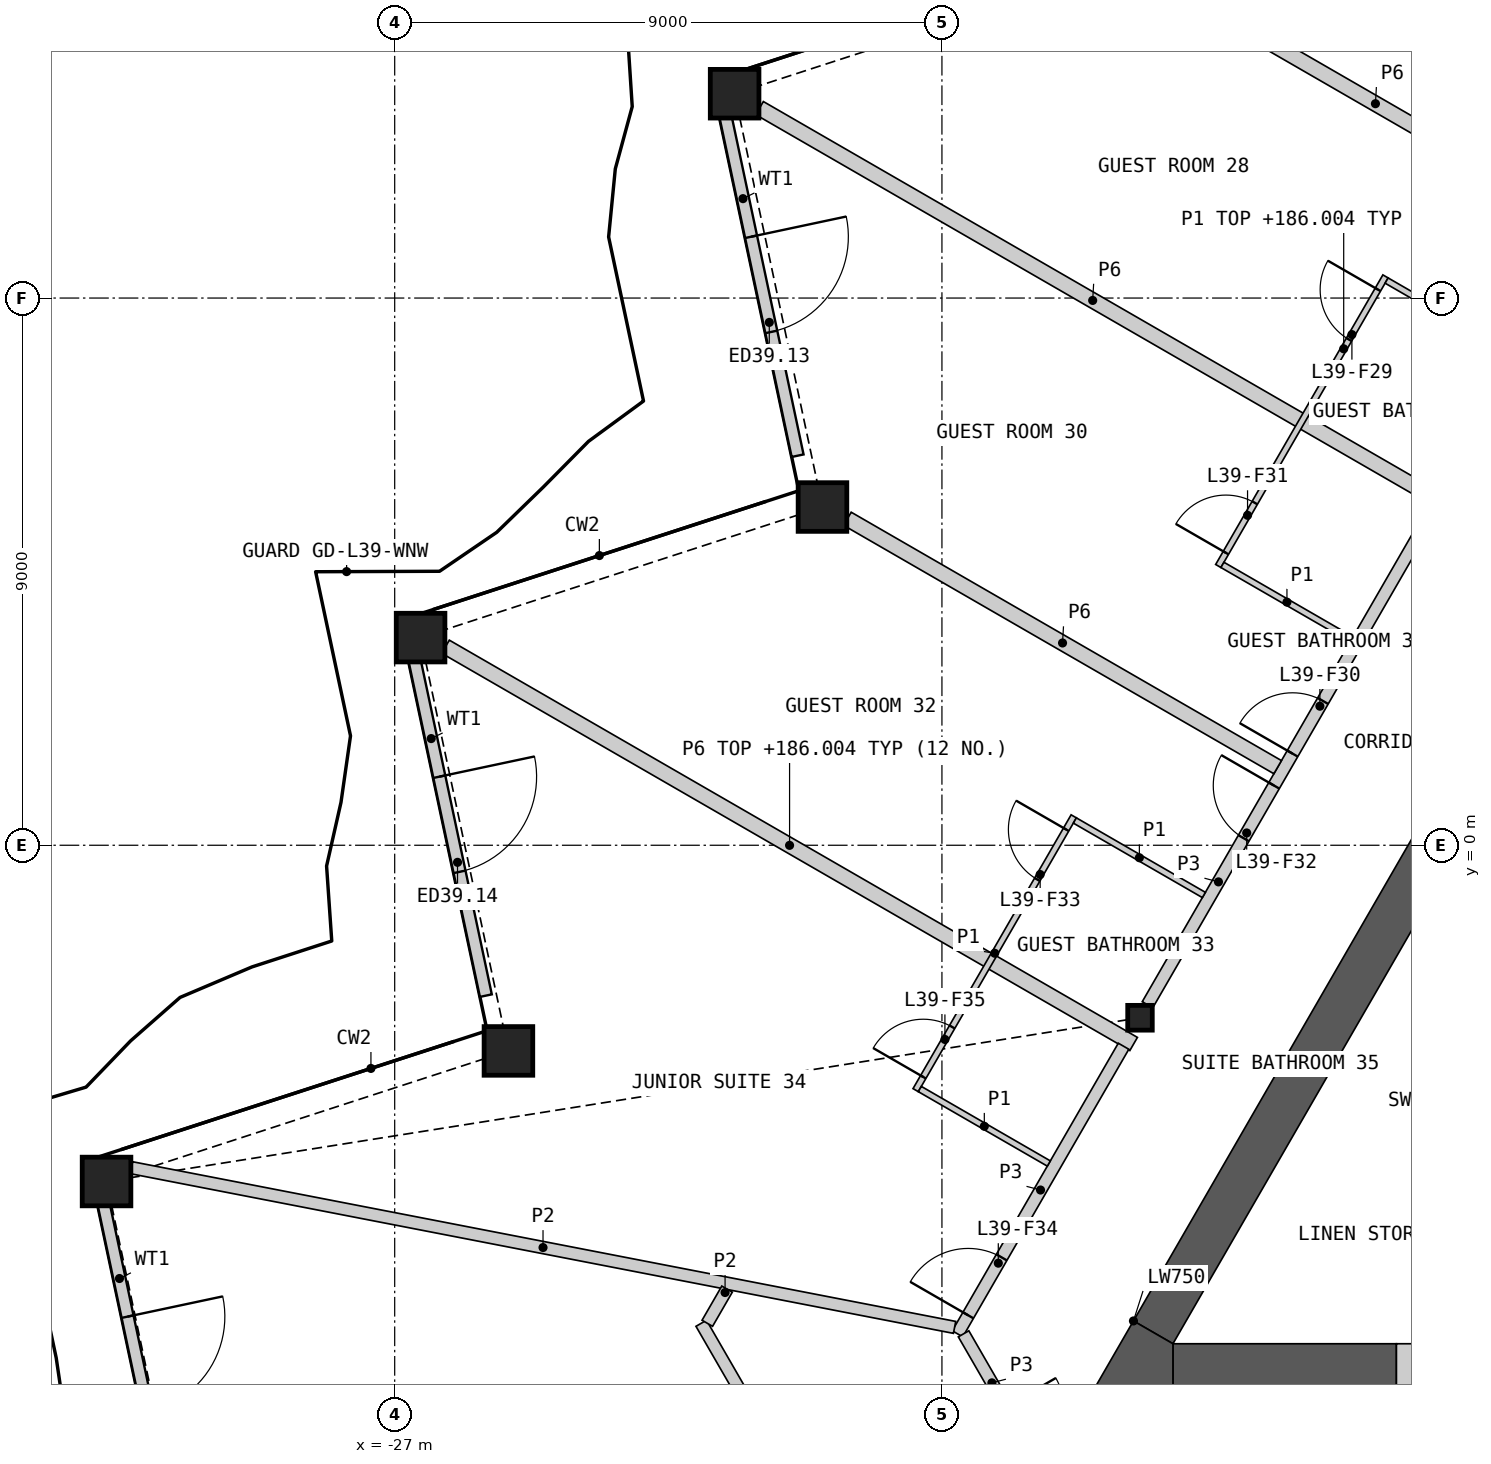
"""IFC4 building model, lengths in metres.
Left out: names, types, materials, properties, quantities, classifications, styles, units other than length and angle.
Written with IfcOpenShell. Run it as: python <this file> out.ifc"""

import sys

from ifc_helpers import new_model, si_unit, direction, frame, frame_2d, origin, origin_2d, place, context, subcontext, project, spatial, polyline, rectangle, hollow_rectangle, i_section, outline, extrude, element, fill, save


model = new_model("IFC4")
c1 = context("Model", 3, precision=1e-05, world=origin(), true_north=direction((0.0, 1.0)))
c2 = subcontext(c1, "Body", "Model", "MODEL_VIEW")
j1 = project(units=[si_unit("LENGTHUNIT", "METRE"), si_unit("PLANEANGLEUNIT", "RADIAN")], contexts=[c1])
p1 = place(None, origin())
s1 = spatial("IfcSite", under=j1, at=p1, CompositionType="ELEMENT")
p2 = place(p1, origin())
s2 = spatial("IfcBuilding", under=s1, at=p2, CompositionType="ELEMENT")
p3 = place(p2, frame((0.0, 0.0, 183.6)))
s3 = spatial("IfcBuildingStorey", under=s2, at=p3, CompositionType="ELEMENT", Elevation=183.6)
for number, where, z_axis, x_axis in (
    (1, (-21.409, 12.361, 0.0), (0.0, 0.0, 1.0), (1.0, 0.0, 0.0)),
    (2, (-19.965, 5.563, 0.0), (0.0, 0.0, 1.0), (1.0, 0.0, 0.0)),
    (3, (-26.574, 3.415, 0.0), (0.0, 0.0, 1.0), (1.0, 0.0, 0.0)),
    (4, (-25.129, -3.383, 0.0), (0.0, 0.0, 1.0), (1.0, 0.0, 0.0)),
    (5, (-31.739, -5.53, 0.0), (0.0, 0.0, 1.0), (1.0, 0.0, 0.0)),
):
    element("IfcColumn", number, at=place(p3, frame(where, z_axis=z_axis, x_axis=x_axis)), inside=s3, PredefinedType="COLUMN", context=c2, shape_type="SweptSolid", body=[
        extrude(hollow_rectangle(XDim=0.8, YDim=0.8, WallThickness=0.05, at=origin_2d()), origin(), (0.0, 0.0, 1.0), 3.6),
    ])
p4 = place(p3, frame((-14.743, -2.837, 0.0), z_axis=(0.0, 0.0, 1.0), x_axis=(1.0, 0.0, 0.0)))
e6 = element("IfcColumn", 6, at=p4, inside=s3, PredefinedType="COLUMN", context=c2, shape_type="SweptSolid", body=[
    extrude(i_section(OverallWidth=0.404, OverallDepth=0.407, WebThickness=0.027, FlangeThickness=0.044, at=origin_2d()), origin(), (0.0, 0.0, 1.0), 3.6),
])
p5 = place(p3, frame((-21.572, 12.044, 0.0), z_axis=(0.0, 0.0, 1.0), x_axis=(0.207914487103, -0.978147006361, 0.0)))
e7 = element("IfcWall", 7, at=p5, inside=s3, PredefinedType="SOLIDWALL", context=c2, shape_type="SweptSolid", body=[
    extrude(rectangle(XDim=5.763, YDim=0.2, at=frame_2d((2.882, 0.0))), origin(), (0.0, 0.0, 1.0), 2.701),
])
p6 = place(p5, frame((2.082, 0.0, 0.0)))
e8 = element("IfcOpeningElement", 8, at=p6, cuts=e7, PredefinedType="OPENING", context=c2, shape_type="SweptSolid", body=[
    extrude(rectangle(XDim=1.6, YDim=2.4, at=frame_2d((0.8, 1.2))), frame((0.0, 0.11, 0.0), z_axis=(0.0, -1.0, 0.0), x_axis=(1.0, 0.0, 0.0)), (0.0, 0.0, 1.0), 0.22),
])
p7 = place(p3, frame((-26.699, 3.164, 0.0), z_axis=(0.0, 0.0, 1.0), x_axis=(0.207914487103, -0.978147006361, 0.0)))
e9 = element("IfcWall", 9, at=p7, inside=s3, PredefinedType="SOLIDWALL", context=c2, shape_type="SweptSolid", body=[
    extrude(rectangle(XDim=5.763, YDim=0.2, at=frame_2d((2.882, 0.0))), origin(), (0.0, 0.0, 1.0), 2.701),
])
p8 = place(p7, frame((2.082, 0.0, 0.0)))
e10 = element("IfcOpeningElement", 10, at=p8, cuts=e9, PredefinedType="OPENING", context=c2, shape_type="SweptSolid", body=[
    extrude(rectangle(XDim=1.6, YDim=2.4, at=frame_2d((0.8, 1.2))), frame((0.0, 0.11, 0.0), z_axis=(0.0, -1.0, 0.0), x_axis=(1.0, 0.0, 0.0)), (0.0, 0.0, 1.0), 0.22),
])
p9 = place(p3, frame((-31.826, -5.717, 0.0), z_axis=(0.0, 0.0, 1.0), x_axis=(0.207914487103, -0.978147006361, 0.0)))
e11 = element("IfcWall", 11, at=p9, inside=s3, PredefinedType="SOLIDWALL", context=c2, shape_type="SweptSolid", body=[
    extrude(rectangle(XDim=5.763, YDim=0.2, at=frame_2d((2.882, 0.0))), origin(), (0.0, 0.0, 1.0), 2.701),
])
p10 = place(p9, frame((2.082, 0.0, 0.0)))
e12 = element("IfcOpeningElement", 12, at=p10, cuts=e11, PredefinedType="OPENING", context=c2, shape_type="SweptSolid", body=[
    extrude(rectangle(XDim=1.6, YDim=2.4, at=frame_2d((0.8, 1.2))), frame((0.0, 0.11, 0.0), z_axis=(0.0, -1.0, 0.0), x_axis=(1.0, 0.0, 0.0)), (0.0, 0.0, 1.0), 0.22),
])
p11 = place(p3, origin())
e13 = element("IfcWall", 13, at=p11, inside=s3, PredefinedType="SHEAR", context=c2, shape_type="SweptSolid", body=[
    extrude(outline(polyline([(-5.307, -1.281), (-10.374, -4.206), (-10.032, -4.298), (-5.182, -1.498), (-5.307, -1.281)])), origin(), (0.0, 0.0, 1.0), 3.25),
])
p12 = place(p3, origin())
e14 = element("IfcWall", 14, at=p12, inside=s3, PredefinedType="SHEAR", context=c2, shape_type="SweptSolid", body=[
    extrude(outline(polyline([(-10.374, -4.206), (-8.83, -6.881), (-8.738, -6.539), (-10.032, -4.298), (-10.374, -4.206)])), origin(), (0.0, 0.0, 1.0), 3.25),
])
p13 = place(p3, frame((-14.201, -8.574, 0.0), z_axis=(0.0, 0.0, 1.0), x_axis=(1.0, 0.0, 0.0)))
e15 = element("IfcWall", 15, at=p13, inside=s3, PredefinedType="SHEAR", context=c2, shape_type="SweptSolid", body=[
    extrude(rectangle(XDim=3.676, YDim=0.75, at=frame_2d((1.838, 0.0))), origin(), (0.0, 0.0, 1.0), 3.25),
])
p14 = place(p3, frame((-9.625, 0.477, 0.0), z_axis=(0.0, 0.0, 1.0), x_axis=(-0.499986234705, -0.866033351035, 0.0)))
e16 = element("IfcWall", 16, at=p14, inside=s3, PredefinedType="SHEAR", context=c2, shape_type="SweptSolid", body=[
    extrude(rectangle(XDim=9.801, YDim=0.75, at=frame_2d((4.9, 0.0))), origin(), (0.0, 0.0, 1.0), 3.25),
])
p15 = place(p3, origin())
e17 = element("IfcWall", 17, at=p15, inside=s3, PredefinedType="SHEAR", context=c2, shape_type="SweptSolid", body=[
    extrude(outline(polyline([(-14.851, -7.824), (-14.201, -8.199), (-14.201, -8.949), (-15.5, -8.949), (-14.851, -7.824)])), origin(), (0.0, 0.0, 1.0), 3.25),
])
p16 = place(p3, frame((-10.525, -8.574, 0.0), z_axis=(0.0, 0.0, 1.0), x_axis=(1.0, 0.0, 0.0)))
e18 = element("IfcWall", 18, at=p16, inside=s3, PredefinedType="SHEAR", context=c2, shape_type="SweptSolid", body=[
    extrude(rectangle(XDim=2.2, YDim=0.75, at=frame_2d((1.1, 0.0))), origin(), (0.0, 0.0, 1.0), 3.25),
])
p17 = place(p16, frame((0.6, 0.0, 0.0)))
e19 = element("IfcOpeningElement", 19, at=p17, cuts=e18, PredefinedType="OPENING", context=c2, shape_type="SweptSolid", body=[
    extrude(rectangle(XDim=1.0, YDim=2.1, at=frame_2d((0.5, 1.05))), frame((0.0, 0.385, 0.0), z_axis=(0.0, -1.0, 0.0), x_axis=(1.0, 0.0, 0.0)), (0.0, 0.0, 1.0), 0.77),
])
p18 = place(p3, frame((-26.164, 3.265, 0.0), z_axis=(0.0, 0.0, 1.0), x_axis=(0.866021313335, -0.500007084799, 0.0)))
e20 = element("IfcWall", 20, at=p18, inside=s3, PredefinedType="PARTITIONING", context=c2, shape_type="SweptSolid", body=[
    extrude(rectangle(XDim=13.068, YDim=0.25, at=frame_2d((6.534, 0.0))), origin(), (0.0, 0.0, 1.0), 2.404),
])
p19 = place(p3, frame((-21.0, 12.124, 0.0), z_axis=(0.0, 0.0, 1.0), x_axis=(0.866025883649, -0.499999168849, 0.0)))
e21 = element("IfcWall", 21, at=p19, inside=s3, PredefinedType="PARTITIONING", context=c2, shape_type="SweptSolid", body=[
    extrude(rectangle(XDim=12.652, YDim=0.25, at=frame_2d((6.326, 0.0))), origin(), (0.0, 0.0, 1.0), 2.404),
])
p20 = place(p3, frame((-14.619, -2.624, 0.0), z_axis=(0.0, 0.0, 1.0), x_axis=(0.50000393355, 0.866023132736, 0.0)))
e22 = element("IfcWall", 22, at=p20, inside=s3, PredefinedType="PARTITIONING", context=c2, shape_type="SweptSolid", body=[
    extrude(rectangle(XDim=9.335, YDim=0.2, at=frame_2d((4.667, 0.0))), origin(), (0.0, 0.0, 1.0), 3.25),
])
p21 = place(p20, frame((4.77, 0.0, 0.0)))
e23 = element("IfcOpeningElement", 23, at=p21, cuts=e22, PredefinedType="OPENING", context=c2, shape_type="SweptSolid", body=[
    extrude(rectangle(XDim=1.0, YDim=2.1, at=frame_2d((0.5, 1.05))), frame((0.0, 0.11, 0.0), z_axis=(0.0, -1.0, 0.0), x_axis=(1.0, 0.0, 0.0)), (0.0, 0.0, 1.0), 0.22),
])
p22 = place(p20, frame((3.163, 0.0, 0.0)))
e24 = element("IfcOpeningElement", 24, at=p22, cuts=e22, PredefinedType="OPENING", context=c2, shape_type="SweptSolid", body=[
    extrude(rectangle(XDim=1.0, YDim=2.1, at=frame_2d((0.5, 1.05))), frame((0.0, 0.11, 0.0), z_axis=(0.0, -1.0, 0.0), x_axis=(1.0, 0.0, 0.0)), (0.0, 0.0, 1.0), 0.22),
])
p23 = place(p3, frame((-19.555, 5.37, 0.0), z_axis=(0.0, 0.0, 1.0), x_axis=(0.866024371346, -0.500001788232, 0.0)))
e25 = element("IfcWall", 25, at=p23, inside=s3, PredefinedType="PARTITIONING", context=c2, shape_type="SweptSolid", body=[
    extrude(rectangle(XDim=8.171, YDim=0.25, at=frame_2d((4.085, 0.0))), origin(), (0.0, 0.0, 1.0), 2.404),
])
p24 = place(p3, frame((-14.39, 14.228, 0.0), z_axis=(0.0, 0.0, 1.0), x_axis=(0.866031008936, -0.499990291468, 0.0)))
e26 = element("IfcWall", 26, at=p24, inside=s3, PredefinedType="PARTITIONING", context=c2, shape_type="SweptSolid", body=[
    extrude(rectangle(XDim=8.127, YDim=0.25, at=frame_2d((4.063, 0.0))), origin(), (0.0, 0.0, 1.0), 2.404),
])
p25 = place(p3, frame((-17.744, -8.035, 0.0), z_axis=(0.0, 0.0, 1.0), x_axis=(0.49998041698, 0.866036709751, 0.0)))
e27 = element("IfcWall", 27, at=p25, inside=s3, PredefinedType="PARTITIONING", context=c2, shape_type="SweptSolid", body=[
    extrude(rectangle(XDim=5.462, YDim=0.2, at=frame_2d((2.731, 0.0))), origin(), (0.0, 0.0, 1.0), 3.25),
])
p26 = place(p25, frame((0.352, 0.0, 0.0)))
e28 = element("IfcOpeningElement", 28, at=p26, cuts=e27, PredefinedType="OPENING", context=c2, shape_type="SweptSolid", body=[
    extrude(rectangle(XDim=1.1, YDim=2.1, at=frame_2d((0.55, 1.05))), frame((0.0, 0.11, 0.0), z_axis=(0.0, -1.0, 0.0), x_axis=(1.0, 0.0, 0.0)), (0.0, 0.0, 1.0), 0.22),
])
p27 = place(p3, frame((-17.644, -8.035, 0.0), z_axis=(0.0, 0.0, 1.0), x_axis=(0.499958791762, -0.866049194065, 0.0)))
e29 = element("IfcWall", 29, at=p27, inside=s3, PredefinedType="PARTITIONING", context=c2, shape_type="SweptSolid", body=[
    extrude(rectangle(XDim=3.726, YDim=0.2, at=frame_2d((1.863, 0.0))), origin(), (0.0, 0.0, 1.0), 3.25),
])
p28 = place(p27, frame((1.388, 0.0, 0.0)))
e30 = element("IfcOpeningElement", 30, at=p28, cuts=e29, PredefinedType="OPENING", context=c2, shape_type="SweptSolid", body=[
    extrude(rectangle(XDim=0.95, YDim=2.1, at=frame_2d((0.475, 1.05))), frame((0.0, 0.11, 0.0), z_axis=(0.0, -1.0, 0.0), x_axis=(1.0, 0.0, 0.0)), (0.0, 0.0, 1.0), 0.22),
])
p29 = place(p3, frame((-31.329, -5.303, 0.0), z_axis=(0.0, 0.0, 1.0), x_axis=(0.981696755608, -0.190450728612, 0.0)))
e31 = element("IfcWall", 31, at=p29, inside=s3, PredefinedType="PARTITIONING", context=c2, shape_type="SweptSolid", body=[
    extrude(rectangle(XDim=13.79, YDim=0.2, at=frame_2d((6.895, 0.0))), origin(), (0.0, 0.0, 1.0), 2.404),
])
p30 = place(p3, frame((-21.958, -7.862, 0.0), z_axis=(0.0, 0.0, 1.0), x_axis=(0.499987304225, -0.866032733569, 0.0)))
e32 = element("IfcWall", 32, at=p30, inside=s3, PredefinedType="PARTITIONING", context=c2, shape_type="SweptSolid", body=[
    extrude(rectangle(XDim=4.176, YDim=0.2, at=frame_2d((2.088, 0.0))), origin(), (0.0, 0.0, 1.0), 2.404),
])
p31 = place(p3, frame((-21.859, -7.862, 0.0), z_axis=(0.0, 0.0, 1.0), x_axis=(0.500102178127, 0.865966403178, 0.0)))
e33 = element("IfcWall", 33, at=p31, inside=s3, PredefinedType="PARTITIONING", context=c2, shape_type="SweptSolid", body=[
    extrude(rectangle(XDim=0.649, YDim=0.2, at=frame_2d((0.325, 0.0))), origin(), (0.0, 0.0, 1.0), 2.404),
])
p32 = place(p3, frame((-13.455, 4.593, 0.0), z_axis=(0.0, 0.0, 1.0), x_axis=(0.500015767406, 0.866016300277, 0.0)))
e34 = element("IfcWall", 34, at=p32, inside=s3, PredefinedType="PARTITIONING", context=c2, shape_type="SweptSolid", body=[
    extrude(rectangle(XDim=5.5, YDim=0.1, at=frame_2d((2.75, 0.0))), origin(), (0.0, 0.0, 1.0), 2.404),
])
p33 = place(p32, frame((4.3, 0.0, 0.0)))
e35 = element("IfcOpeningElement", 35, at=p33, cuts=e34, PredefinedType="OPENING", context=c2, shape_type="SweptSolid", body=[
    extrude(rectangle(XDim=0.95, YDim=2.1, at=frame_2d((0.475, 1.05))), frame((0.0, 0.06, 0.0), z_axis=(0.0, -1.0, 0.0), x_axis=(1.0, 0.0, 0.0)), (0.0, 0.0, 1.0), 0.12),
])
p34 = place(p32, frame((0.25, 0.0, 0.0)))
e36 = element("IfcOpeningElement", 36, at=p34, cuts=e34, PredefinedType="OPENING", context=c2, shape_type="SweptSolid", body=[
    extrude(rectangle(XDim=0.95, YDim=2.1, at=frame_2d((0.475, 1.05))), frame((0.0, 0.06, 0.0), z_axis=(0.0, -1.0, 0.0), x_axis=(1.0, 0.0, 0.0)), (0.0, 0.0, 1.0), 0.12),
])
p35 = place(p3, frame((-18.432, -4.028, 0.0), z_axis=(0.0, 0.0, 1.0), x_axis=(0.499992051641, 0.866029992723, 0.0)))
e37 = element("IfcWall", 37, at=p35, inside=s3, PredefinedType="PARTITIONING", context=c2, shape_type="SweptSolid", body=[
    extrude(rectangle(XDim=5.2, YDim=0.1, at=frame_2d((2.6, 0.0))), origin(), (0.0, 0.0, 1.0), 2.404),
])
p36 = place(p35, frame((4.0, 0.0, 0.0)))
e38 = element("IfcOpeningElement", 38, at=p36, cuts=e37, PredefinedType="OPENING", context=c2, shape_type="SweptSolid", body=[
    extrude(rectangle(XDim=0.95, YDim=2.1, at=frame_2d((0.475, 1.05))), frame((0.0, 0.06, 0.0), z_axis=(0.0, -1.0, 0.0), x_axis=(1.0, 0.0, 0.0)), (0.0, 0.0, 1.0), 0.12),
])
p37 = place(p35, frame((0.25, 0.0, 0.0)))
e39 = element("IfcOpeningElement", 39, at=p37, cuts=e37, PredefinedType="OPENING", context=c2, shape_type="SweptSolid", body=[
    extrude(rectangle(XDim=0.95, YDim=2.1, at=frame_2d((0.475, 1.05))), frame((0.0, 0.06, 0.0), z_axis=(0.0, -1.0, 0.0), x_axis=(1.0, 0.0, 0.0)), (0.0, 0.0, 1.0), 0.12),
])
p38 = place(p3, frame((-13.387, 4.611, 0.0), z_axis=(0.0, 0.0, 1.0), x_axis=(0.866032905446, -0.499987006516, 0.0)))
e40 = element("IfcWall", 40, at=p38, inside=s3, PredefinedType="PARTITIONING", context=c2, shape_type="SweptSolid", body=[
    extrude(rectangle(XDim=2.45, YDim=0.1, at=frame_2d((1.225, 0.0))), origin(), (0.0, 0.0, 1.0), 2.404),
])
for number, where, z_axis, x_axis in (
    (41, (-15.814, 0.407, 0.0), (0.0, 0.0, 1.0), (0.866, -0.5, 0.0)),
    (42, (-18.364, -4.01, 0.0), (0.0, 0.0, 1.0), (0.866, -0.5, 0.0)),
):
    element("IfcWall", number, at=place(p3, frame(where, z_axis=z_axis, x_axis=x_axis)), inside=s3, PredefinedType="PARTITIONING", context=c2, shape_type="SweptSolid", body=[
        extrude(rectangle(XDim=2.45, YDim=0.1, at=frame_2d((1.225, 0.0))), origin(), (0.0, 0.0, 1.0), 2.404),
    ])
p39 = place(p3, frame((-10.687, 9.288, 0.0), z_axis=(0.0, 0.0, 1.0), x_axis=(0.866032905446, -0.499987006516, 0.0)))
e43 = element("IfcWall", 43, at=p39, inside=s3, PredefinedType="PARTITIONING", context=c2, shape_type="SweptSolid", body=[
    extrude(rectangle(XDim=2.45, YDim=0.1, at=frame_2d((1.225, 0.0))), origin(), (0.0, 0.0, 1.0), 2.404),
])
p40 = place(p6, origin())
e44 = element("IfcDoor", 44, at=p40, inside=s3, OperationType="DOUBLE_DOOR_SINGLE_SWING", PredefinedType="DOOR", context=c2, shape_type="SweptSolid", body=[
    extrude(rectangle(XDim=1.6, YDim=2.4, at=frame_2d((0.8, 1.2))), frame((0.0, 0.025, 0.0), z_axis=(0.0, -1.0, 0.0), x_axis=(1.0, 0.0, 0.0)), (0.0, 0.0, 1.0), 0.05),
])
fill(e8, e44)
p41 = place(p8, origin())
e45 = element("IfcDoor", 45, at=p41, inside=s3, OperationType="DOUBLE_DOOR_SINGLE_SWING", PredefinedType="DOOR", context=c2, shape_type="SweptSolid", body=[
    extrude(rectangle(XDim=1.6, YDim=2.4, at=frame_2d((0.8, 1.2))), frame((0.0, 0.025, 0.0), z_axis=(0.0, -1.0, 0.0), x_axis=(1.0, 0.0, 0.0)), (0.0, 0.0, 1.0), 0.05),
])
fill(e10, e45)
p42 = place(p10, origin())
e46 = element("IfcDoor", 46, at=p42, inside=s3, OperationType="DOUBLE_DOOR_SINGLE_SWING", PredefinedType="DOOR", context=c2, shape_type="SweptSolid", body=[
    extrude(rectangle(XDim=1.6, YDim=2.4, at=frame_2d((0.8, 1.2))), frame((0.0, 0.025, 0.0), z_axis=(0.0, -1.0, 0.0), x_axis=(1.0, 0.0, 0.0)), (0.0, 0.0, 1.0), 0.05),
])
fill(e12, e46)
p43 = place(p33, origin())
e47 = element("IfcDoor", 47, at=p43, inside=s3, OperationType="SINGLE_SWING_RIGHT", PredefinedType="DOOR", context=c2, shape_type="SweptSolid", body=[
    extrude(rectangle(XDim=0.95, YDim=2.1, at=frame_2d((0.475, 1.05))), frame((0.0, 0.025, 0.0), z_axis=(0.0, -1.0, 0.0), x_axis=(1.0, 0.0, 0.0)), (0.0, 0.0, 1.0), 0.05),
])
fill(e35, e47)
p44 = place(p21, origin())
e48 = element("IfcDoor", 48, at=p44, inside=s3, OperationType="SINGLE_SWING_LEFT", PredefinedType="DOOR", context=c2, shape_type="SweptSolid", body=[
    extrude(rectangle(XDim=1.0, YDim=2.1, at=frame_2d((0.5, 1.05))), frame((0.0, 0.025, 0.0), z_axis=(0.0, -1.0, 0.0), x_axis=(1.0, 0.0, 0.0)), (0.0, 0.0, 1.0), 0.05),
])
fill(e23, e48)
p45 = place(p34, origin())
e49 = element("IfcDoor", 49, at=p45, inside=s3, OperationType="SINGLE_SWING_LEFT", PredefinedType="DOOR", context=c2, shape_type="SweptSolid", body=[
    extrude(rectangle(XDim=0.95, YDim=2.1, at=frame_2d((0.475, 1.05))), frame((0.0, 0.025, 0.0), z_axis=(0.0, -1.0, 0.0), x_axis=(1.0, 0.0, 0.0)), (0.0, 0.0, 1.0), 0.05),
])
fill(e36, e49)
p46 = place(p22, origin())
e50 = element("IfcDoor", 50, at=p46, inside=s3, OperationType="SINGLE_SWING_RIGHT", PredefinedType="DOOR", context=c2, shape_type="SweptSolid", body=[
    extrude(rectangle(XDim=1.0, YDim=2.1, at=frame_2d((0.5, 1.05))), frame((0.0, 0.025, 0.0), z_axis=(0.0, -1.0, 0.0), x_axis=(1.0, 0.0, 0.0)), (0.0, 0.0, 1.0), 0.05),
])
fill(e24, e50)
p47 = place(p36, origin())
e51 = element("IfcDoor", 51, at=p47, inside=s3, OperationType="SINGLE_SWING_RIGHT", PredefinedType="DOOR", context=c2, shape_type="SweptSolid", body=[
    extrude(rectangle(XDim=0.95, YDim=2.1, at=frame_2d((0.475, 1.05))), frame((0.0, 0.025, 0.0), z_axis=(0.0, -1.0, 0.0), x_axis=(1.0, 0.0, 0.0)), (0.0, 0.0, 1.0), 0.05),
])
fill(e38, e51)
p48 = place(p26, origin())
e52 = element("IfcDoor", 52, at=p48, inside=s3, OperationType="SINGLE_SWING_LEFT", PredefinedType="DOOR", context=c2, shape_type="SweptSolid", body=[
    extrude(rectangle(XDim=1.1, YDim=2.1, at=frame_2d((0.55, 1.05))), frame((0.0, 0.025, 0.0), z_axis=(0.0, -1.0, 0.0), x_axis=(1.0, 0.0, 0.0)), (0.0, 0.0, 1.0), 0.05),
])
fill(e28, e52)
p49 = place(p37, origin())
e53 = element("IfcDoor", 53, at=p49, inside=s3, OperationType="SINGLE_SWING_LEFT", PredefinedType="DOOR", context=c2, shape_type="SweptSolid", body=[
    extrude(rectangle(XDim=0.95, YDim=2.1, at=frame_2d((0.475, 1.05))), frame((0.0, 0.025, 0.0), z_axis=(0.0, -1.0, 0.0), x_axis=(1.0, 0.0, 0.0)), (0.0, 0.0, 1.0), 0.05),
])
fill(e39, e53)
save(model, sys.argv[1])
